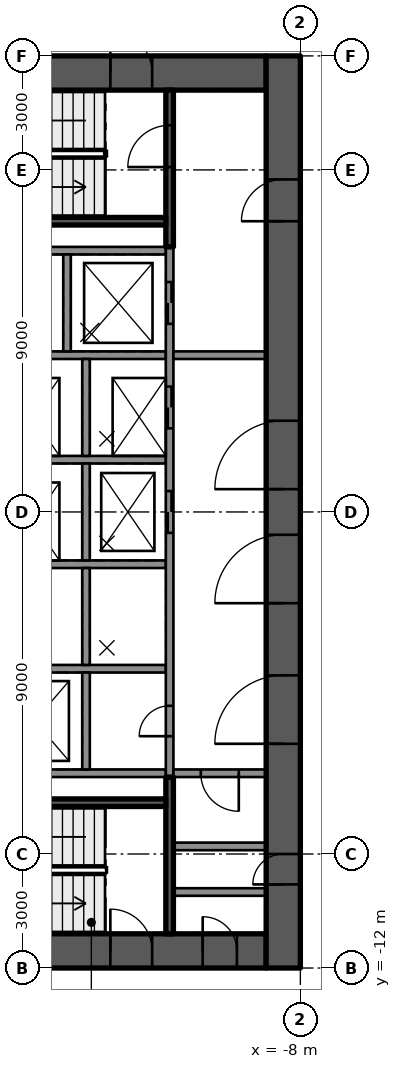
"""IFC4 building model, lengths in metres.
Left out: names, types, materials, properties, quantities, classifications, styles, units other than length and angle.
Written with IfcOpenShell. Run it as: python <this file> out.ifc"""

import sys

from ifc_helpers import new_model, si_unit, direction, frame, frame_2d, origin, place, context, subcontext, project, spatial, rectangle, extrude, element, fill, save


model = new_model("IFC4")
c1 = context("Model", 3, precision=1e-05, world=origin(), true_north=direction((0.0, 1.0)))
c2 = subcontext(c1, "Body", "Model", "MODEL_VIEW")
j1 = project(units=[si_unit("LENGTHUNIT", "METRE"), si_unit("PLANEANGLEUNIT", "RADIAN")], contexts=[c1])
p1 = place(None, origin())
s1 = spatial("IfcSite", under=j1, at=p1, CompositionType="ELEMENT")
p2 = place(p1, origin())
s2 = spatial("IfcBuilding", under=s1, at=p2, CompositionType="ELEMENT")
p3 = place(p2, frame((0.0, 0.0, 76.3)))
s3 = spatial("IfcBuildingStorey", under=s2, at=p3, CompositionType="ELEMENT", Elevation=76.3)
p4 = place(p3, frame((-18.1, 11.55, 0.0), z_axis=(0.0, 0.0, 1.0), x_axis=(1.0, 0.0, 0.0)))
e1 = element("IfcWall", 1, at=p4, inside=s3, PredefinedType="SHEAR", context=c2, shape_type="SweptSolid", body=[
    extrude(rectangle(XDim=9.2, YDim=0.9, at=frame_2d((4.6, 0.0))), origin(), (0.0, 0.0, 1.0), 4.4),
])
p5 = place(p4, frame((5.1, 0.0, 0.0)))
e2 = element("IfcOpeningElement", 2, at=p5, cuts=e1, PredefinedType="OPENING", context=c2, shape_type="SweptSolid", body=[
    extrude(rectangle(XDim=1.1, YDim=2.1, at=frame_2d((0.55, 1.05))), frame((0.0, 0.46, 0.0), z_axis=(0.0, -1.0, 0.0), x_axis=(1.0, 0.0, 0.0)), (0.0, 0.0, 1.0), 0.92),
])
p6 = place(p3, frame((-18.1, -11.55, 0.0), z_axis=(0.0, 0.0, 1.0), x_axis=(1.0, 0.0, 0.0)))
e3 = element("IfcWall", 3, at=p6, inside=s3, PredefinedType="SHEAR", context=c2, shape_type="SweptSolid", body=[
    extrude(rectangle(XDim=9.2, YDim=0.9, at=frame_2d((4.6, 0.0))), origin(), (0.0, 0.0, 1.0), 4.4),
])
p7 = place(p6, frame((5.1, 0.0, 0.0)))
e4 = element("IfcOpeningElement", 4, at=p7, cuts=e3, PredefinedType="OPENING", context=c2, shape_type="SweptSolid", body=[
    extrude(rectangle(XDim=1.1, YDim=2.1, at=frame_2d((0.55, 1.05))), frame((0.0, 0.46, 0.0), z_axis=(0.0, -1.0, 0.0), x_axis=(1.0, 0.0, 0.0)), (0.0, 0.0, 1.0), 0.92),
])
p8 = place(p6, frame((7.53, 0.0, 0.0)))
e5 = element("IfcOpeningElement", 5, at=p8, cuts=e3, PredefinedType="OPENING", context=c2, shape_type="SweptSolid", body=[
    extrude(rectangle(XDim=0.9, YDim=2.1, at=frame_2d((0.45, 1.05))), frame((0.0, 0.46, 0.0), z_axis=(0.0, -1.0, 0.0), x_axis=(1.0, 0.0, 0.0)), (0.0, 0.0, 1.0), 0.92),
])
p9 = place(p3, frame((-8.45, -12.0, 0.0), z_axis=(0.0, 0.0, 1.0), x_axis=(0.0, 1.0, 0.0)))
e6 = element("IfcWall", 6, at=p9, inside=s3, PredefinedType="SHEAR", context=c2, shape_type="SweptSolid", body=[
    extrude(rectangle(XDim=24.0, YDim=0.9, at=frame_2d((12.0, 0.0))), origin(), (0.0, 0.0, 1.0), 4.4),
])
p10 = place(p9, frame((9.6, 0.0, 0.0)))
e7 = element("IfcOpeningElement", 7, at=p10, cuts=e6, PredefinedType="OPENING", context=c2, shape_type="SweptSolid", body=[
    extrude(rectangle(XDim=1.8, YDim=2.1, at=frame_2d((0.9, 1.05))), frame((0.0, 0.46, 0.0), z_axis=(0.0, -1.0, 0.0), x_axis=(1.0, 0.0, 0.0)), (0.0, 0.0, 1.0), 0.92),
])
p11 = place(p9, frame((5.9, 0.0, 0.0)))
e8 = element("IfcOpeningElement", 8, at=p11, cuts=e6, PredefinedType="OPENING", context=c2, shape_type="SweptSolid", body=[
    extrude(rectangle(XDim=1.8, YDim=2.1, at=frame_2d((0.9, 1.05))), frame((0.0, 0.46, 0.0), z_axis=(0.0, -1.0, 0.0), x_axis=(1.0, 0.0, 0.0)), (0.0, 0.0, 1.0), 0.92),
])
p12 = place(p9, frame((12.6, 0.0, 0.0)))
e9 = element("IfcOpeningElement", 9, at=p12, cuts=e6, PredefinedType="OPENING", context=c2, shape_type="SweptSolid", body=[
    extrude(rectangle(XDim=1.8, YDim=2.1, at=frame_2d((0.9, 1.05))), frame((0.0, 0.46, 0.0), z_axis=(0.0, -1.0, 0.0), x_axis=(1.0, 0.0, 0.0)), (0.0, 0.0, 1.0), 0.92),
])
p13 = place(p9, frame((19.65, 0.0, 0.0)))
e10 = element("IfcOpeningElement", 10, at=p13, cuts=e6, PredefinedType="OPENING", context=c2, shape_type="SweptSolid", body=[
    extrude(rectangle(XDim=1.1, YDim=2.1, at=frame_2d((0.55, 1.05))), frame((0.0, 0.46, 0.0), z_axis=(0.0, -1.0, 0.0), x_axis=(1.0, 0.0, 0.0)), (0.0, 0.0, 1.0), 0.92),
])
p14 = place(p9, frame((2.2, 0.0, 0.0)))
e11 = element("IfcOpeningElement", 11, at=p14, cuts=e6, PredefinedType="OPENING", context=c2, shape_type="SweptSolid", body=[
    extrude(rectangle(XDim=0.8, YDim=2.1, at=frame_2d((0.4, 1.05))), frame((0.0, 0.46, 0.0), z_axis=(0.0, -1.0, 0.0), x_axis=(1.0, 0.0, 0.0)), (0.0, 0.0, 1.0), 0.92),
])
for number, where, z_axis, x_axis in (
    (12, (-11.54, 6.875, 0.0), (0.0, 0.0, 1.0), (-1.0, 0.0, 0.0)),
    (13, (-11.54, -6.875, 0.0), (0.0, 0.0, 1.0), (-1.0, 0.0, 0.0)),
):
    element("IfcWall", number, at=place(p3, frame(where, z_axis=z_axis, x_axis=x_axis)), inside=s3, PredefinedType="SOLIDWALL", context=c2, shape_type="SweptSolid", body=[
        extrude(rectangle(XDim=6.56, YDim=0.2, at=frame_2d((3.28, 0.0))), origin(), (0.0, 0.0, 1.0), 3.99),
    ])
p15 = place(p3, frame((-11.54, -4.125, 0.0), z_axis=(0.0, 0.0, 1.0), x_axis=(-1.0, 0.0, 0.0)))
e14 = element("IfcWall", 14, at=p15, inside=s3, PredefinedType="SOLIDWALL", context=c2, shape_type="SweptSolid", body=[
    extrude(rectangle(XDim=4.7, YDim=0.2, at=frame_2d((2.35, 0.0))), origin(), (0.0, 0.0, 1.0), 3.99),
])
for number, where, z_axis, x_axis in (
    (15, (-11.54, -1.375, 0.0), (0.0, 0.0, 1.0), (-1.0, 0.0, 0.0)),
    (16, (-11.54, 1.375, 0.0), (0.0, 0.0, 1.0), (-1.0, 0.0, 0.0)),
):
    element("IfcWall", number, at=place(p3, frame(where, z_axis=z_axis, x_axis=x_axis)), inside=s3, PredefinedType="SOLIDWALL", context=c2, shape_type="SweptSolid", body=[
        extrude(rectangle(XDim=4.2, YDim=0.2, at=frame_2d((2.1, 0.0))), origin(), (0.0, 0.0, 1.0), 3.99),
    ])
p16 = place(p3, frame((-11.54, 4.125, 0.0), z_axis=(0.0, 0.0, 1.0), x_axis=(-1.0, 0.0, 0.0)))
e17 = element("IfcWall", 17, at=p16, inside=s3, PredefinedType="SOLIDWALL", context=c2, shape_type="SweptSolid", body=[
    extrude(rectangle(XDim=4.7, YDim=0.2, at=frame_2d((2.35, 0.0))), origin(), (0.0, 0.0, 1.0), 3.99),
])
p17 = place(p3, frame((-11.44, -6.975, 0.0), z_axis=(0.0, 0.0, 1.0), x_axis=(0.0, 1.0, 0.0)))
e18 = element("IfcWall", 18, at=p17, inside=s3, PredefinedType="SOLIDWALL", context=c2, shape_type="SweptSolid", body=[
    extrude(rectangle(XDim=13.95, YDim=0.2, at=frame_2d((6.975, 0.0))), origin(), (0.0, 0.0, 1.0), 3.99),
])
p18 = place(p17, frame((6.425, 0.0, 0.0)))
e19 = element("IfcOpeningElement", 19, at=p18, cuts=e18, PredefinedType="OPENING", context=c2, shape_type="SweptSolid", body=[
    extrude(rectangle(XDim=1.1, YDim=2.1, at=frame_2d((0.55, 1.05))), frame((0.0, 0.11, 0.0), z_axis=(0.0, -1.0, 0.0), x_axis=(1.0, 0.0, 0.0)), (0.0, 0.0, 1.0), 0.22),
])
p19 = place(p17, frame((9.175, 0.0, 0.0)))
e20 = element("IfcOpeningElement", 20, at=p19, cuts=e18, PredefinedType="OPENING", context=c2, shape_type="SweptSolid", body=[
    extrude(rectangle(XDim=1.1, YDim=2.1, at=frame_2d((0.55, 1.05))), frame((0.0, 0.11, 0.0), z_axis=(0.0, -1.0, 0.0), x_axis=(1.0, 0.0, 0.0)), (0.0, 0.0, 1.0), 0.22),
])
p20 = place(p17, frame((11.925, 0.0, 0.0)))
e21 = element("IfcOpeningElement", 21, at=p20, cuts=e18, PredefinedType="OPENING", context=c2, shape_type="SweptSolid", body=[
    extrude(rectangle(XDim=1.1, YDim=2.1, at=frame_2d((0.55, 1.05))), frame((0.0, 0.11, 0.0), z_axis=(0.0, -1.0, 0.0), x_axis=(1.0, 0.0, 0.0)), (0.0, 0.0, 1.0), 0.22),
])
p21 = place(p17, frame((1.075, 0.0, 0.0)))
e22 = element("IfcOpeningElement", 22, at=p21, cuts=e18, PredefinedType="OPENING", context=c2, shape_type="SweptSolid", body=[
    extrude(rectangle(XDim=0.8, YDim=2.1, at=frame_2d((0.4, 1.05))), frame((0.0, 0.11, 0.0), z_axis=(0.0, -1.0, 0.0), x_axis=(1.0, 0.0, 0.0)), (0.0, 0.0, 1.0), 0.22),
])
for number, where, z_axis, x_axis in (
    (23, (-13.64, -6.775, 0.0), (0.0, 0.0, 1.0), (0.0, 1.0, 0.0)),
    (24, (-13.64, -4.025, 0.0), (0.0, 0.0, 1.0), (0.0, 1.0, 0.0)),
    (25, (-13.64, -1.275, 0.0), (0.0, 0.0, 1.0), (0.0, 1.0, 0.0)),
    (26, (-13.64, 1.475, 0.0), (0.0, 0.0, 1.0), (0.0, 1.0, 0.0)),
    (27, (-14.14, 4.225, 0.0), (0.0, 0.0, 1.0), (0.0, 1.0, 0.0)),
):
    element("IfcWall", number, at=place(p3, frame(where, z_axis=z_axis, x_axis=x_axis)), inside=s3, PredefinedType="SOLIDWALL", context=c2, shape_type="SweptSolid", body=[
        extrude(rectangle(XDim=2.55, YDim=0.2, at=frame_2d((1.275, 0.0))), origin(), (0.0, 0.0, 1.0), 3.99),
    ])
p22 = place(p3, frame((-11.44, 6.975, 0.0), z_axis=(0.0, 0.0, 1.0), x_axis=(0.0, 1.0, 0.0)))
e28 = element("IfcWall", 28, at=p22, inside=s3, PredefinedType="SOLIDWALL", context=c2, shape_type="SweptSolid", body=[
    extrude(rectangle(XDim=4.125, YDim=0.2, at=frame_2d((2.062, 0.0))), origin(), (0.0, 0.0, 1.0), 3.99),
])
p23 = place(p22, frame((2.1, 0.0, 0.0)))
e29 = element("IfcOpeningElement", 29, at=p23, cuts=e28, PredefinedType="OPENING", context=c2, shape_type="SweptSolid", body=[
    extrude(rectangle(XDim=1.1, YDim=2.1, at=frame_2d((0.55, 1.05))), frame((0.0, 0.11, 0.0), z_axis=(0.0, -1.0, 0.0), x_axis=(1.0, 0.0, 0.0)), (0.0, 0.0, 1.0), 0.22),
])
p24 = place(p3, frame((-11.54, 7.65, 0.0), z_axis=(0.0, 0.0, 1.0), x_axis=(-1.0, 0.0, 0.0)))
e30 = element("IfcWall", 30, at=p24, inside=s3, PredefinedType="SOLIDWALL", context=c2, shape_type="SweptSolid", body=[
    extrude(rectangle(XDim=6.56, YDim=0.2, at=frame_2d((3.28, 0.0))), origin(), (0.0, 0.0, 1.0), 3.99),
])
p25 = place(p3, frame((-11.44, -11.1, 0.0), z_axis=(0.0, 0.0, 1.0), x_axis=(0.0, 1.0, 0.0)))
e31 = element("IfcWall", 31, at=p25, inside=s3, PredefinedType="SOLIDWALL", context=c2, shape_type="SweptSolid", body=[
    extrude(rectangle(XDim=4.125, YDim=0.2, at=frame_2d((2.062, 0.0))), origin(), (0.0, 0.0, 1.0), 3.99),
])
p26 = place(p3, frame((-11.54, -7.65, 0.0), z_axis=(0.0, 0.0, 1.0), x_axis=(-1.0, 0.0, 0.0)))
e32 = element("IfcWall", 32, at=p26, inside=s3, PredefinedType="SOLIDWALL", context=c2, shape_type="SweptSolid", body=[
    extrude(rectangle(XDim=6.56, YDim=0.2, at=frame_2d((3.28, 0.0))), origin(), (0.0, 0.0, 1.0), 3.99),
])
p27 = place(p3, frame((-8.9, 4.125, 0.0), z_axis=(0.0, 0.0, 1.0), x_axis=(-1.0, 0.0, 0.0)))
e33 = element("IfcWall", 33, at=p27, inside=s3, PredefinedType="PARTITIONING", context=c2, shape_type="SweptSolid", body=[
    extrude(rectangle(XDim=2.44, YDim=0.2, at=frame_2d((1.22, 0.0))), origin(), (0.0, 0.0, 1.0), 3.99),
])
p28 = place(p3, frame((-8.9, -6.875, 0.0), z_axis=(0.0, 0.0, 1.0), x_axis=(-1.0, 0.0, 0.0)))
e34 = element("IfcWall", 34, at=p28, inside=s3, PredefinedType="PARTITIONING", context=c2, shape_type="SweptSolid", body=[
    extrude(rectangle(XDim=2.44, YDim=0.2, at=frame_2d((1.22, 0.0))), origin(), (0.0, 0.0, 1.0), 3.99),
])
p29 = place(p28, frame((0.72, 0.0, 0.0)))
e35 = element("IfcOpeningElement", 35, at=p29, cuts=e34, PredefinedType="OPENING", context=c2, shape_type="SweptSolid", body=[
    extrude(rectangle(XDim=1.0, YDim=2.1, at=frame_2d((0.5, 1.05))), frame((0.0, 0.11, 0.0), z_axis=(0.0, -1.0, 0.0), x_axis=(1.0, 0.0, 0.0)), (0.0, 0.0, 1.0), 0.22),
])
for number, where, z_axis, x_axis in (
    (36, (-8.9, -10.0, 0.0), (0.0, 0.0, 1.0), (-1.0, 0.0, 0.0)),
    (37, (-8.9, -8.8, 0.0), (0.0, 0.0, 1.0), (-1.0, 0.0, 0.0)),
):
    element("IfcWall", number, at=place(p3, frame(where, z_axis=z_axis, x_axis=x_axis)), inside=s3, PredefinedType="PARTITIONING", context=c2, shape_type="SweptSolid", body=[
        extrude(rectangle(XDim=2.44, YDim=0.2, at=frame_2d((1.22, 0.0))), origin(), (0.0, 0.0, 1.0), 3.99),
    ])
p30 = place(p18, origin())
e38 = element("IfcDoor", 38, at=p30, inside=s3, OperationType="DOUBLE_DOOR_SLIDING", PredefinedType="DOOR", context=c2, shape_type="SweptSolid", body=[
    extrude(rectangle(XDim=1.1, YDim=2.1, at=frame_2d((0.55, 1.05))), frame((0.0, 0.025, 0.0), z_axis=(0.0, -1.0, 0.0), x_axis=(1.0, 0.0, 0.0)), (0.0, 0.0, 1.0), 0.05),
])
fill(e19, e38)
p31 = place(p19, origin())
e39 = element("IfcDoor", 39, at=p31, inside=s3, OperationType="DOUBLE_DOOR_SLIDING", PredefinedType="DOOR", context=c2, shape_type="SweptSolid", body=[
    extrude(rectangle(XDim=1.1, YDim=2.1, at=frame_2d((0.55, 1.05))), frame((0.0, 0.025, 0.0), z_axis=(0.0, -1.0, 0.0), x_axis=(1.0, 0.0, 0.0)), (0.0, 0.0, 1.0), 0.05),
])
fill(e20, e39)
p32 = place(p20, origin())
e40 = element("IfcDoor", 40, at=p32, inside=s3, OperationType="DOUBLE_DOOR_SLIDING", PredefinedType="DOOR", context=c2, shape_type="SweptSolid", body=[
    extrude(rectangle(XDim=1.1, YDim=2.1, at=frame_2d((0.55, 1.05))), frame((0.0, 0.025, 0.0), z_axis=(0.0, -1.0, 0.0), x_axis=(1.0, 0.0, 0.0)), (0.0, 0.0, 1.0), 0.05),
])
fill(e21, e40)
p33 = place(p21, origin())
e41 = element("IfcDoor", 41, at=p33, inside=s3, OperationType="SINGLE_SWING_LEFT", PredefinedType="DOOR", context=c2, shape_type="SweptSolid", body=[
    extrude(rectangle(XDim=0.8, YDim=2.1, at=frame_2d((0.4, 1.05))), frame((0.0, 0.025, 0.0), z_axis=(0.0, -1.0, 0.0), x_axis=(1.0, 0.0, 0.0)), (0.0, 0.0, 1.0), 0.05),
])
fill(e22, e41)
p34 = place(p10, origin())
e42 = element("IfcDoor", 42, at=p34, inside=s3, OperationType="SINGLE_SWING_LEFT", PredefinedType="DOOR", context=c2, shape_type="SweptSolid", body=[
    extrude(rectangle(XDim=1.8, YDim=2.1, at=frame_2d((0.9, 1.05))), frame((0.0, 0.025, 0.0), z_axis=(0.0, -1.0, 0.0), x_axis=(1.0, 0.0, 0.0)), (0.0, 0.0, 1.0), 0.05),
])
fill(e7, e42)
p35 = place(p11, origin())
e43 = element("IfcDoor", 43, at=p35, inside=s3, OperationType="SINGLE_SWING_LEFT", PredefinedType="DOOR", context=c2, shape_type="SweptSolid", body=[
    extrude(rectangle(XDim=1.8, YDim=2.1, at=frame_2d((0.9, 1.05))), frame((0.0, 0.025, 0.0), z_axis=(0.0, -1.0, 0.0), x_axis=(1.0, 0.0, 0.0)), (0.0, 0.0, 1.0), 0.05),
])
fill(e8, e43)
p36 = place(p12, origin())
e44 = element("IfcDoor", 44, at=p36, inside=s3, OperationType="SINGLE_SWING_RIGHT", PredefinedType="DOOR", context=c2, shape_type="SweptSolid", body=[
    extrude(rectangle(XDim=1.8, YDim=2.1, at=frame_2d((0.9, 1.05))), frame((0.0, 0.025, 0.0), z_axis=(0.0, -1.0, 0.0), x_axis=(1.0, 0.0, 0.0)), (0.0, 0.0, 1.0), 0.05),
])
fill(e9, e44)
p37 = place(p13, origin())
e45 = element("IfcDoor", 45, at=p37, inside=s3, OperationType="SINGLE_SWING_RIGHT", PredefinedType="DOOR", context=c2, shape_type="SweptSolid", body=[
    extrude(rectangle(XDim=1.1, YDim=2.1, at=frame_2d((0.55, 1.05))), frame((0.0, 0.025, 0.0), z_axis=(0.0, -1.0, 0.0), x_axis=(1.0, 0.0, 0.0)), (0.0, 0.0, 1.0), 0.05),
])
fill(e10, e45)
p38 = place(p5, origin())
e46 = element("IfcDoor", 46, at=p38, inside=s3, OperationType="SINGLE_SWING_RIGHT", PredefinedType="DOOR", context=c2, shape_type="SweptSolid", body=[
    extrude(rectangle(XDim=1.1, YDim=2.1, at=frame_2d((0.55, 1.05))), frame((0.0, 0.025, 0.0), z_axis=(0.0, -1.0, 0.0), x_axis=(1.0, 0.0, 0.0)), (0.0, 0.0, 1.0), 0.05),
])
fill(e2, e46)
p39 = place(p7, origin())
e47 = element("IfcDoor", 47, at=p39, inside=s3, OperationType="SINGLE_SWING_RIGHT", PredefinedType="DOOR", context=c2, shape_type="SweptSolid", body=[
    extrude(rectangle(XDim=1.1, YDim=2.1, at=frame_2d((0.55, 1.05))), frame((0.0, 0.025, 0.0), z_axis=(0.0, -1.0, 0.0), x_axis=(1.0, 0.0, 0.0)), (0.0, 0.0, 1.0), 0.05),
])
fill(e4, e47)
p40 = place(p23, origin())
e48 = element("IfcDoor", 48, at=p40, inside=s3, OperationType="SINGLE_SWING_RIGHT", PredefinedType="DOOR", context=c2, shape_type="SweptSolid", body=[
    extrude(rectangle(XDim=1.1, YDim=2.1, at=frame_2d((0.55, 1.05))), frame((0.0, 0.025, 0.0), z_axis=(0.0, -1.0, 0.0), x_axis=(1.0, 0.0, 0.0)), (0.0, 0.0, 1.0), 0.05),
])
fill(e29, e48)
p41 = place(p8, origin())
e49 = element("IfcDoor", 49, at=p41, inside=s3, OperationType="SINGLE_SWING_RIGHT", PredefinedType="DOOR", context=c2, shape_type="SweptSolid", body=[
    extrude(rectangle(XDim=0.9, YDim=2.1, at=frame_2d((0.45, 1.05))), frame((0.0, 0.025, 0.0), z_axis=(0.0, -1.0, 0.0), x_axis=(1.0, 0.0, 0.0)), (0.0, 0.0, 1.0), 0.05),
])
fill(e5, e49)
p42 = place(p14, origin())
e50 = element("IfcDoor", 50, at=p42, inside=s3, OperationType="SINGLE_SWING_LEFT", PredefinedType="DOOR", context=c2, shape_type="SweptSolid", body=[
    extrude(rectangle(XDim=0.8, YDim=2.1, at=frame_2d((0.4, 1.05))), frame((0.0, 0.025, 0.0), z_axis=(0.0, -1.0, 0.0), x_axis=(1.0, 0.0, 0.0)), (0.0, 0.0, 1.0), 0.05),
])
fill(e11, e50)
p43 = place(p29, origin())
e51 = element("IfcDoor", 51, at=p43, inside=s3, OperationType="SINGLE_SWING_RIGHT", PredefinedType="DOOR", context=c2, shape_type="SweptSolid", body=[
    extrude(rectangle(XDim=1.0, YDim=2.1, at=frame_2d((0.5, 1.05))), frame((0.0, 0.025, 0.0), z_axis=(0.0, -1.0, 0.0), x_axis=(1.0, 0.0, 0.0)), (0.0, 0.0, 1.0), 0.05),
])
fill(e35, e51)
save(model, sys.argv[1])
